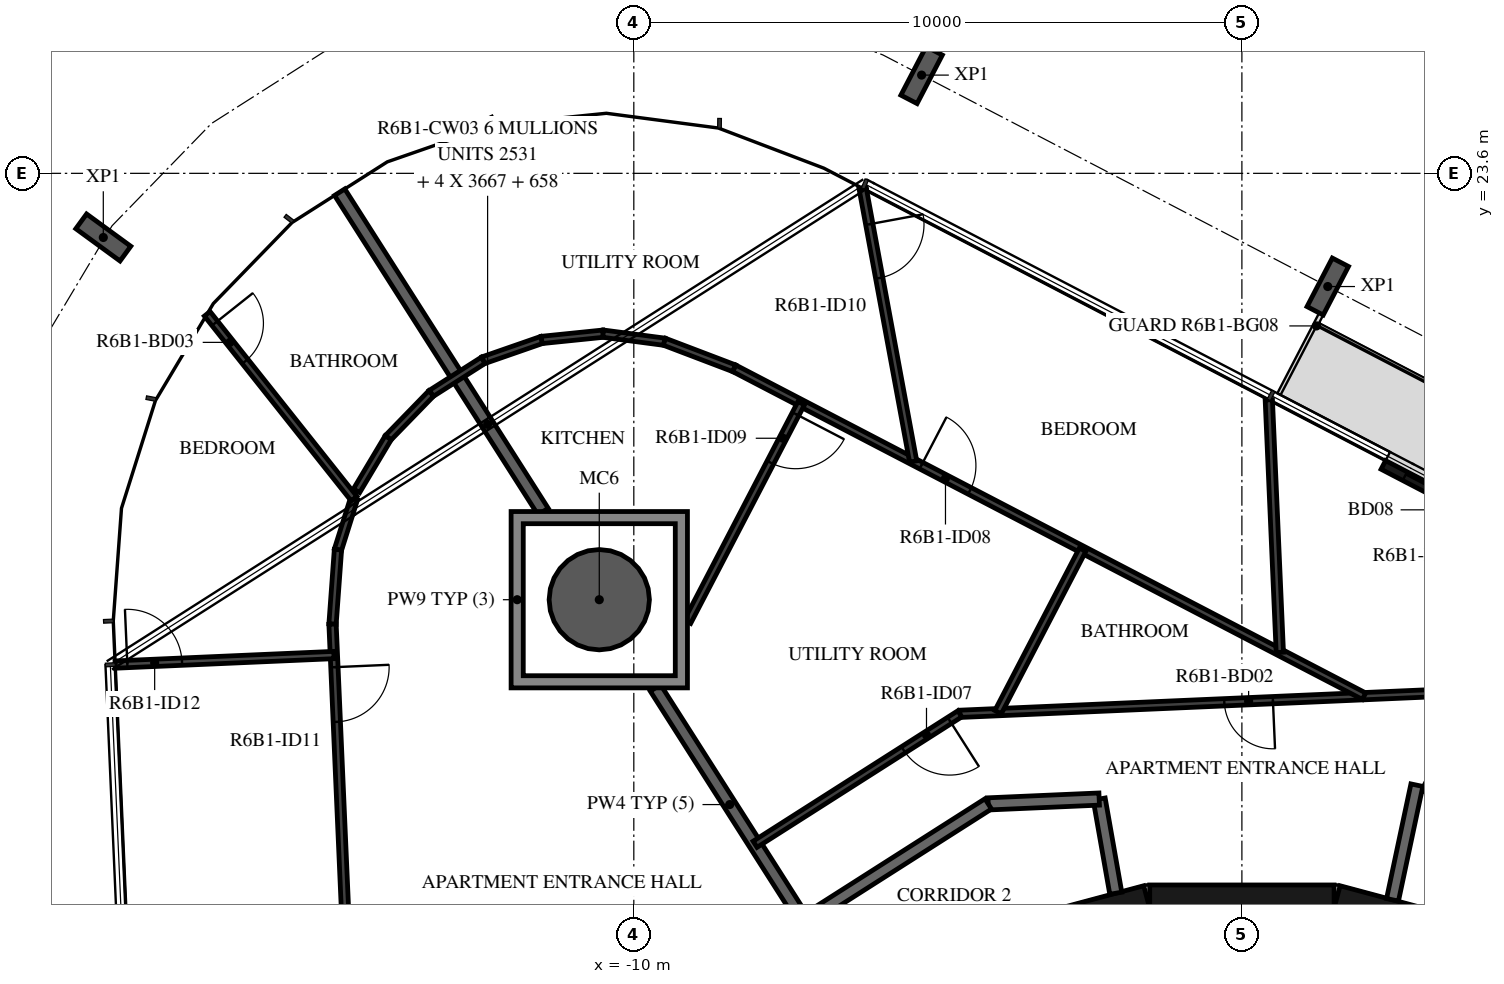
"""IFC4 building model, lengths in metres.
Left out: names, types, materials, properties, quantities, classifications, styles, units other than length and angle.
Written with IfcOpenShell. Run it as: python <this file> out.ifc"""

import sys

from ifc_helpers import new_model, si_unit, direction, frame, frame_2d, origin, origin_2d, place, context, subcontext, project, spatial, polyline, rectangle, hollow_circle, i_section, outline, extrude, element, fill, save


model = new_model("IFC4")
c1 = context("Model", 3, precision=1e-05, world=origin(), true_north=direction((0.0, 1.0)))
c2 = subcontext(c1, "Body", "Model", "MODEL_VIEW")
j1 = project(units=[si_unit("LENGTHUNIT", "METRE"), si_unit("PLANEANGLEUNIT", "RADIAN")], contexts=[c1])
p1 = place(None, origin())
s1 = spatial("IfcSite", under=j1, at=p1, CompositionType="ELEMENT")
p2 = place(p1, origin())
s2 = spatial("IfcBuilding", under=s1, at=p2, CompositionType="ELEMENT")
p3 = place(p2, frame((0.0, 0.0, 237.2)))
s3 = spatial("IfcBuildingStorey", under=s2, at=p3, CompositionType="ELEMENT", Elevation=237.2)
p4 = place(p3, frame((-10.568, 16.588, -0.38), z_axis=(0.0, 0.0, 1.0), x_axis=(1.0, 0.0, 0.0)))
e1 = element("IfcColumn", 1, at=p4, inside=s3, PredefinedType="COLUMN", context=c2, shape_type="SweptSolid", body=[
    extrude(hollow_circle(Radius=0.825, WallThickness=0.04, at=origin_2d()), origin(), (0.0, 0.0, 1.0), 3.5),
])
for number, where, z_axis, x_axis in (
    (2, (1.412, 21.739, -0.38), (0.0, 0.0, 1.0), (0.887, -0.462, 0.0)),
    (3, (-5.267, 25.216, -0.38), (0.0, 0.0, 1.0), (0.887, -0.462, 0.0)),
    (4, (-18.724, 22.545, -0.38), (0.0, 0.0, 1.0), (0.59, 0.808, 0.0)),
):
    element("IfcColumn", number, at=place(p3, frame(where, z_axis=z_axis, x_axis=x_axis)), inside=s3, PredefinedType="COLUMN", context=c2, shape_type="SweptSolid", body=[
        extrude(i_section(OverallWidth=0.3, OverallDepth=0.9, WebThickness=0.019, FlangeThickness=0.035, FilletRadius=0.03, at=origin_2d()), origin(), (0.0, 0.0, 1.0), 3.5),
    ])
p5 = place(p3, frame((5.164, 17.327, 0.0), z_axis=(0.0, 0.0, 1.0), x_axis=(-0.886983100078, 0.461801884119, 0.0)))
e5 = element("IfcWall", 5, at=p5, inside=s3, PredefinedType="STANDARD", context=c2, shape_type="SweptSolid", body=[
    extrude(rectangle(XDim=3.2, YDim=0.16, at=frame_2d((1.6, 0.0))), origin(), (0.0, 0.0, 1.0), 3.12),
])
p6 = place(p5, frame((0.4, 0.0, 0.0)))
e6 = element("IfcOpeningElement", 6, at=p6, cuts=e5, PredefinedType="OPENING", context=c2, shape_type="SweptSolid", body=[
    extrude(rectangle(XDim=2.4, YDim=2.4, at=frame_2d((1.2, 1.2))), frame((0.0, 0.09, 0.0), z_axis=(0.0, -1.0, 0.0), x_axis=(1.0, 0.0, 0.0)), (0.0, 0.0, 1.0), 0.18),
])
for number, where, z_axis, x_axis in (
    (7, (4.479, 10.858, 0.0), (0.0, 0.0, 1.0), (-0.966, 0.259, 0.0)),
    (8, (1.516, 11.647, 0.0), (0.0, 0.0, 1.0), (-1.0, 0.0, 0.0)),
    (9, (-1.55, 11.643, 0.0), (0.0, 0.0, 1.0), (-0.966, -0.259, 0.0)),
):
    element("IfcWall", number, at=place(p3, frame(where, z_axis=z_axis, x_axis=x_axis)), inside=s3, PredefinedType="SHEAR", context=c2, shape_type="SweptSolid", body=[
        extrude(rectangle(XDim=3.033, YDim=0.5, at=frame_2d((1.516, 0.0))), origin(), (0.0, 0.0, 1.0), 3.12),
    ])
p7 = place(p3, frame((9.372, 10.228, 0.0), z_axis=(0.0, 0.0, 1.0), x_axis=(-0.887005184532, 0.461759464021, 0.0)))
e10 = element("IfcWall", 10, at=p7, inside=s3, PredefinedType="STANDARD", context=c2, shape_type="SweptSolid", body=[
    extrude(rectangle(XDim=7.181, YDim=0.2, at=frame_2d((3.591, 0.0))), origin(), (0.0, 0.0, 1.0), 3.12),
])
p8 = place(p3, frame((2.878, 13.538, 0.0), z_axis=(0.0, 0.0, 1.0), x_axis=(-0.207893604596, -0.978151444904, 0.0)))
e11 = element("IfcWall", 11, at=p8, inside=s3, PredefinedType="STANDARD", context=c2, shape_type="SweptSolid", body=[
    extrude(rectangle(XDim=1.927, YDim=0.2, at=frame_2d((0.963, 0.0))), origin(), (0.0, 0.0, 1.0), 3.12),
])
p9 = place(p3, frame((-2.074, 11.761, 0.0), z_axis=(0.0, 0.0, 1.0), x_axis=(-0.173679082312, 0.984802303189, 0.0)))
e12 = element("IfcWall", 12, at=p9, inside=s3, PredefinedType="STANDARD", context=c2, shape_type="SweptSolid", body=[
    extrude(rectangle(XDim=1.573, YDim=0.2, at=frame_2d((0.787, 0.0))), origin(), (0.0, 0.0, 1.0), 3.12),
])
p10 = place(p3, frame((-2.347, 13.31, 0.0), z_axis=(0.0, 0.0, 1.0), x_axis=(-0.999050095671, -0.043576442492, 0.0)))
e13 = element("IfcWall", 13, at=p10, inside=s3, PredefinedType="STANDARD", context=c2, shape_type="SweptSolid", body=[
    extrude(rectangle(XDim=1.826, YDim=0.2, at=frame_2d((0.913, 0.0))), origin(), (0.0, 0.0, 1.0), 3.12),
])
p11 = place(p3, frame((-4.172, 13.231, 0.0), z_axis=(0.0, 0.0, 1.0), x_axis=(-0.843388394728, -0.537304397561, 0.0)))
e14 = element("IfcWall", 14, at=p11, inside=s3, PredefinedType="STANDARD", context=c2, shape_type="SweptSolid", body=[
    extrude(rectangle(XDim=7.181, YDim=0.2, at=frame_2d((3.59, 0.0))), origin(), (0.0, 0.0, 1.0), 3.12),
])
p12 = place(p3, frame((-9.645, 15.138, 0.0), z_axis=(0.0, 0.0, 1.0), x_axis=(0.537267800866, -0.84341170857, 0.0)))
e15 = element("IfcWall", 15, at=p12, inside=s3, PredefinedType="STANDARD", context=c2, shape_type="SweptSolid", body=[
    extrude(rectangle(XDim=4.55, YDim=0.2, at=frame_2d((2.275, 0.0))), origin(), (0.0, 0.0, 1.0), 3.12),
])
p13 = place(p3, frame((-14.837, 23.29, 0.0), z_axis=(0.0, 0.0, 1.0), x_axis=(0.537316863221, -0.843380452998, 0.0)))
e16 = element("IfcWall", 16, at=p13, inside=s3, PredefinedType="STANDARD", context=c2, shape_type="SweptSolid", body=[
    extrude(rectangle(XDim=6.227, YDim=0.2, at=frame_2d((3.113, 0.0))), origin(), (0.0, 0.0, 1.0), 3.12),
])
p14 = place(p3, frame((3.339, 15.06, 0.0), z_axis=(0.0, 0.0, 1.0), x_axis=(-0.999047716945, -0.043630943905, 0.0)))
e17 = element("IfcWall", 17, at=p14, inside=s3, PredefinedType="PARTITIONING", context=c2, shape_type="SweptSolid", body=[
    extrude(rectangle(XDim=7.985, YDim=0.12, at=frame_2d((3.992, 0.0))), origin(), (0.0, 0.0, 1.0), 3.12),
])
p15 = place(p14, frame((2.831, 0.0, 0.0)))
e18 = element("IfcOpeningElement", 18, at=p15, cuts=e17, PredefinedType="OPENING", context=c2, shape_type="SweptSolid", body=[
    extrude(rectangle(XDim=0.8, YDim=2.1, at=frame_2d((0.4, 1.05))), frame((0.0, 0.07, 0.0), z_axis=(0.0, -1.0, 0.0), x_axis=(1.0, 0.0, 0.0)), (0.0, 0.0, 1.0), 0.14),
])
p16 = place(p3, frame((-4.639, 14.712, 0.0), z_axis=(0.0, 0.0, 1.0), x_axis=(-0.843376843237, -0.537322529113, 0.0)))
e19 = element("IfcWall", 19, at=p16, inside=s3, PredefinedType="PARTITIONING", context=c2, shape_type="SweptSolid", body=[
    extrude(rectangle(XDim=3.992, YDim=0.12, at=frame_2d((1.996, 0.0))), origin(), (0.0, 0.0, 1.0), 3.12),
])
p17 = place(p16, frame((0.2, 0.0, 0.0)))
e20 = element("IfcOpeningElement", 20, at=p17, cuts=e19, PredefinedType="OPENING", context=c2, shape_type="SweptSolid", body=[
    extrude(rectangle(XDim=0.9, YDim=2.1, at=frame_2d((0.45, 1.05))), frame((0.0, 0.07, 0.0), z_axis=(0.0, -1.0, 0.0), x_axis=(1.0, 0.0, 0.0)), (0.0, 0.0, 1.0), 0.14),
])
p18 = place(p3, frame((-8.35, 20.394, 0.0), z_axis=(0.0, 0.0, 1.0), x_axis=(0.887020940825, -0.461729196107, 0.0)))
e21 = element("IfcWall", 21, at=p18, inside=s3, PredefinedType="PARTITIONING", context=c2, shape_type="SweptSolid", body=[
    extrude(rectangle(XDim=11.678, YDim=0.12, at=frame_2d((5.839, 0.0))), origin(), (0.0, 0.0, 1.0), 3.12),
])
p19 = place(p18, frame((3.469, 0.0, 0.0)))
e22 = element("IfcOpeningElement", 22, at=p19, cuts=e21, PredefinedType="OPENING", context=c2, shape_type="SweptSolid", body=[
    extrude(rectangle(XDim=0.9, YDim=2.1, at=frame_2d((0.45, 1.05))), frame((0.0, 0.07, 0.0), z_axis=(0.0, -1.0, 0.0), x_axis=(1.0, 0.0, 0.0)), (0.0, 0.0, 1.0), 0.14),
])
p20 = place(p3, frame((0.442, 19.876, 0.0), z_axis=(0.0, 0.0, 1.0), x_axis=(0.043638577658, -0.999047383531, 0.0)))
e23 = element("IfcWall", 23, at=p20, inside=s3, PredefinedType="PARTITIONING", context=c2, shape_type="SweptSolid", body=[
    extrude(rectangle(XDim=4.157, YDim=0.12, at=frame_2d((2.078, 0.0))), origin(), (0.0, 0.0, 1.0), 3.12),
])
p21 = place(p3, frame((-2.619, 17.411, 0.0), z_axis=(0.0, 0.0, 1.0), x_axis=(-0.461743141736, -0.887013681439, 0.0)))
e24 = element("IfcWall", 24, at=p21, inside=s3, PredefinedType="PARTITIONING", context=c2, shape_type="SweptSolid", body=[
    extrude(rectangle(XDim=3.012, YDim=0.12, at=frame_2d((1.506, 0.0))), origin(), (0.0, 0.0, 1.0), 3.12),
])
p22 = place(p3, frame((-6.237, 23.353, 0.0), z_axis=(0.0, 0.0, 1.0), x_axis=(0.181909323114, -0.983315309636, 0.0)))
e25 = element("IfcWall", 25, at=p22, inside=s3, PredefinedType="PARTITIONING", context=c2, shape_type="SweptSolid", body=[
    extrude(rectangle(XDim=4.567, YDim=0.12, at=frame_2d((2.284, 0.0))), origin(), (0.0, 0.0, 1.0), 3.12),
])
p23 = place(p22, frame((0.6, 0.0, 0.0)))
e26 = element("IfcOpeningElement", 26, at=p23, cuts=e25, PredefinedType="OPENING", context=c2, shape_type="SweptSolid", body=[
    extrude(rectangle(XDim=0.9, YDim=2.1, at=frame_2d((0.45, 1.05))), frame((0.0, 0.07, 0.0), z_axis=(0.0, -1.0, 0.0), x_axis=(1.0, 0.0, 0.0)), (0.0, 0.0, 1.0), 0.14),
])
p24 = place(p3, frame((-7.247, 19.82, 0.0), z_axis=(0.0, 0.0, 1.0), x_axis=(-0.461733980956, -0.887018450107, 0.0)))
e27 = element("IfcWall", 27, at=p24, inside=s3, PredefinedType="PARTITIONING", context=c2, shape_type="SweptSolid", body=[
    extrude(rectangle(XDim=4.052, YDim=0.12, at=frame_2d((2.026, 0.0))), origin(), (0.0, 0.0, 1.0), 3.12),
])
p25 = place(p24, frame((0.2, 0.0, 0.0)))
e28 = element("IfcOpeningElement", 28, at=p25, cuts=e27, PredefinedType="OPENING", context=c2, shape_type="SweptSolid", body=[
    extrude(rectangle(XDim=0.9, YDim=2.1, at=frame_2d((0.45, 1.05))), frame((0.0, 0.07, 0.0), z_axis=(0.0, -1.0, 0.0), x_axis=(1.0, 0.0, 0.0)), (0.0, 0.0, 1.0), 0.14),
])
for number, where, z_axis, x_axis in (
    (29, (-13.332, 19.981, 0.0), (0.0, 0.0, 1.0), (0.843, 0.537, 0.0)),
    (30, (-12.475, 20.527, 0.0), (0.0, 0.0, 1.0), (0.945, 0.328, 0.0)),
):
    element("IfcWall", number, at=place(p3, frame(where, z_axis=z_axis, x_axis=x_axis)), inside=s3, PredefinedType="PARTITIONING", context=c2, shape_type="SweptSolid", body=[
        extrude(rectangle(XDim=1.016, YDim=0.12, at=frame_2d((0.508, 0.0))), origin(), (0.0, 0.0, 1.0), 3.12),
    ])
p26 = place(p3, frame((-11.515, 20.86, 0.0), z_axis=(0.0, 0.0, 1.0), x_axis=(0.994818278641, 0.101669034034, 0.0)))
e31 = element("IfcWall", 31, at=p26, inside=s3, PredefinedType="PARTITIONING", context=c2, shape_type="SweptSolid", body=[
    extrude(rectangle(XDim=1.016, YDim=0.12, at=frame_2d((0.508, 0.0))), origin(), (0.0, 0.0, 1.0), 3.12),
])
p27 = place(p3, frame((-10.504, 20.963, 0.0), z_axis=(0.0, 0.0, 1.0), x_axis=(0.991451023706, -0.13047937612, 0.0)))
e32 = element("IfcWall", 32, at=p27, inside=s3, PredefinedType="PARTITIONING", context=c2, shape_type="SweptSolid", body=[
    extrude(rectangle(XDim=1.016, YDim=0.12, at=frame_2d((0.508, 0.0))), origin(), (0.0, 0.0, 1.0), 3.12),
])
p28 = place(p3, frame((-9.497, 20.831, 0.0), z_axis=(0.0, 0.0, 1.0), x_axis=(0.934575963521, -0.355763641213, 0.0)))
e33 = element("IfcWall", 33, at=p28, inside=s3, PredefinedType="PARTITIONING", context=c2, shape_type="SweptSolid", body=[
    extrude(rectangle(XDim=1.227, YDim=0.12, at=frame_2d((0.614, 0.0))), origin(), (0.0, 0.0, 1.0), 3.12),
])
for number, where, z_axis, x_axis in (
    (34, (-13.332, 19.981, 0.0), (0.0, 0.0, 1.0), (-0.697, -0.717, 0.0)),
    (35, (-14.039, 19.252, 0.0), (0.0, 0.0, 1.0), (-0.513, -0.859, 0.0)),
):
    element("IfcWall", number, at=place(p3, frame(where, z_axis=z_axis, x_axis=x_axis)), inside=s3, PredefinedType="PARTITIONING", context=c2, shape_type="SweptSolid", body=[
        extrude(rectangle(XDim=1.016, YDim=0.12, at=frame_2d((0.508, 0.0))), origin(), (0.0, 0.0, 1.0), 3.12),
    ])
p29 = place(p3, frame((-14.601, 18.25, 0.0), z_axis=(0.0, 0.0, 1.0), x_axis=(-0.300706496876, -0.953716730867, 0.0)))
e36 = element("IfcWall", 36, at=p29, inside=s3, PredefinedType="PARTITIONING", context=c2, shape_type="SweptSolid", body=[
    extrude(rectangle(XDim=0.88, YDim=0.12, at=frame_2d((0.44, 0.0))), origin(), (0.0, 0.0, 1.0), 3.12),
])
p30 = place(p3, frame((-14.865, 17.411, 0.0), z_axis=(0.0, 0.0, 1.0), x_axis=(-0.072618457011, -0.997359794508, 0.0)))
e37 = element("IfcWall", 37, at=p30, inside=s3, PredefinedType="PARTITIONING", context=c2, shape_type="SweptSolid", body=[
    extrude(rectangle(XDim=1.227, YDim=0.12, at=frame_2d((0.614, 0.0))), origin(), (0.0, 0.0, 1.0), 3.12),
])
p31 = place(p3, frame((-14.955, 16.187, 0.0), z_axis=(0.0, 0.0, 1.0), x_axis=(0.04360777668, -0.999048728448, 0.0)))
e38 = element("IfcWall", 38, at=p31, inside=s3, PredefinedType="PARTITIONING", context=c2, shape_type="SweptSolid", body=[
    extrude(rectangle(XDim=11.679, YDim=0.12, at=frame_2d((5.839, 0.0))), origin(), (0.0, 0.0, 1.0), 3.12),
])
p32 = place(p31, frame((0.709, 0.0, 0.0)))
e39 = element("IfcOpeningElement", 39, at=p32, cuts=e38, PredefinedType="OPENING", context=c2, shape_type="SweptSolid", body=[
    extrude(rectangle(XDim=0.9, YDim=2.1, at=frame_2d((0.45, 1.05))), frame((0.0, 0.07, 0.0), z_axis=(0.0, -1.0, 0.0), x_axis=(1.0, 0.0, 0.0)), (0.0, 0.0, 1.0), 0.14),
])
p33 = place(p3, frame((-17.015, 21.29, 0.0), z_axis=(0.0, 0.0, 1.0), x_axis=(0.621976289729, -0.783036075168, 0.0)))
e40 = element("IfcWall", 40, at=p33, inside=s3, PredefinedType="PARTITIONING", context=c2, shape_type="SweptSolid", body=[
    extrude(rectangle(XDim=3.882, YDim=0.12, at=frame_2d((1.941, 0.0))), origin(), (0.0, 0.0, 1.0), 3.12),
])
p34 = place(p33, frame((0.2, 0.0, 0.0)))
e41 = element("IfcOpeningElement", 41, at=p34, cuts=e40, PredefinedType="OPENING", context=c2, shape_type="SweptSolid", body=[
    extrude(rectangle(XDim=0.8, YDim=2.1, at=frame_2d((0.4, 1.05))), frame((0.0, 0.07, 0.0), z_axis=(0.0, -1.0, 0.0), x_axis=(1.0, 0.0, 0.0)), (0.0, 0.0, 1.0), 0.14),
])
p35 = place(p3, frame((-18.529, 15.522, 0.0), z_axis=(0.0, 0.0, 1.0), x_axis=(0.999048722018, 0.043607923987, 0.0)))
e42 = element("IfcWall", 42, at=p35, inside=s3, PredefinedType="PARTITIONING", context=c2, shape_type="SweptSolid", body=[
    extrude(rectangle(XDim=3.6, YDim=0.12, at=frame_2d((1.8, 0.0))), origin(), (0.0, 0.0, 1.0), 2.73),
])
p36 = place(p35, frame((0.2, 0.0, 0.0)))
e43 = element("IfcOpeningElement", 43, at=p36, cuts=e42, PredefinedType="OPENING", context=c2, shape_type="SweptSolid", body=[
    extrude(rectangle(XDim=0.9, YDim=2.1, at=frame_2d((0.45, 1.05))), frame((0.0, 0.07, 0.0), z_axis=(0.0, -1.0, 0.0), x_axis=(1.0, 0.0, 0.0)), (0.0, 0.0, 1.0), 0.14),
])
p37 = place(p3, origin())
e44 = element("IfcWall", 44, at=p37, inside=s3, PredefinedType="STANDARD", context=c2, shape_type="SweptSolid", body=[
    extrude(outline(polyline([(-9.118, 18.038), (-9.118, 15.138), (-12.018, 15.138), (-12.018, 18.038), (-9.118, 18.038)]), holes=[polyline([(-11.818, 15.338), (-9.318, 15.338), (-9.318, 17.838), (-11.818, 17.838), (-11.818, 15.338)])]), origin(), (0.0, 0.0, 1.0), 3.12),
])
p38 = place(p6, origin())
e45 = element("IfcDoor", 45, at=p38, inside=s3, OperationType="DOUBLE_DOOR_SLIDING", PredefinedType="DOOR", context=c2, shape_type="SweptSolid", body=[
    extrude(rectangle(XDim=2.4, YDim=2.4, at=frame_2d((1.2, 1.2))), frame((0.0, 0.025, 0.0), z_axis=(0.0, -1.0, 0.0), x_axis=(1.0, 0.0, 0.0)), (0.0, 0.0, 1.0), 0.05),
])
fill(e6, e45)
p39 = place(p15, origin())
e46 = element("IfcDoor", 46, at=p39, inside=s3, OperationType="SINGLE_SWING_RIGHT", PredefinedType="DOOR", context=c2, shape_type="SweptSolid", body=[
    extrude(rectangle(XDim=0.8, YDim=2.1, at=frame_2d((0.4, 1.05))), frame((0.0, 0.025, 0.0), z_axis=(0.0, -1.0, 0.0), x_axis=(1.0, 0.0, 0.0)), (0.0, 0.0, 1.0), 0.05),
])
fill(e18, e46)
p40 = place(p17, origin())
e47 = element("IfcDoor", 47, at=p40, inside=s3, OperationType="SINGLE_SWING_RIGHT", PredefinedType="DOOR", context=c2, shape_type="SweptSolid", body=[
    extrude(rectangle(XDim=0.9, YDim=2.1, at=frame_2d((0.45, 1.05))), frame((0.0, 0.025, 0.0), z_axis=(0.0, -1.0, 0.0), x_axis=(1.0, 0.0, 0.0)), (0.0, 0.0, 1.0), 0.05),
])
fill(e20, e47)
p41 = place(p19, origin())
e48 = element("IfcDoor", 48, at=p41, inside=s3, OperationType="SINGLE_SWING_RIGHT", PredefinedType="DOOR", context=c2, shape_type="SweptSolid", body=[
    extrude(rectangle(XDim=0.9, YDim=2.1, at=frame_2d((0.45, 1.05))), frame((0.0, 0.025, 0.0), z_axis=(0.0, -1.0, 0.0), x_axis=(1.0, 0.0, 0.0)), (0.0, 0.0, 1.0), 0.05),
])
fill(e22, e48)
p42 = place(p25, origin())
e49 = element("IfcDoor", 49, at=p42, inside=s3, OperationType="SINGLE_SWING_RIGHT", PredefinedType="DOOR", context=c2, shape_type="SweptSolid", body=[
    extrude(rectangle(XDim=0.9, YDim=2.1, at=frame_2d((0.45, 1.05))), frame((0.0, 0.025, 0.0), z_axis=(0.0, -1.0, 0.0), x_axis=(1.0, 0.0, 0.0)), (0.0, 0.0, 1.0), 0.05),
])
fill(e28, e49)
p43 = place(p23, origin())
e50 = element("IfcDoor", 50, at=p43, inside=s3, OperationType="SINGLE_SWING_RIGHT", PredefinedType="DOOR", context=c2, shape_type="SweptSolid", body=[
    extrude(rectangle(XDim=0.9, YDim=2.1, at=frame_2d((0.45, 1.05))), frame((0.0, 0.025, 0.0), z_axis=(0.0, -1.0, 0.0), x_axis=(1.0, 0.0, 0.0)), (0.0, 0.0, 1.0), 0.05),
])
fill(e26, e50)
p44 = place(p32, origin())
e51 = element("IfcDoor", 51, at=p44, inside=s3, OperationType="SINGLE_SWING_LEFT", PredefinedType="DOOR", context=c2, shape_type="SweptSolid", body=[
    extrude(rectangle(XDim=0.9, YDim=2.1, at=frame_2d((0.45, 1.05))), frame((0.0, 0.025, 0.0), z_axis=(0.0, -1.0, 0.0), x_axis=(1.0, 0.0, 0.0)), (0.0, 0.0, 1.0), 0.05),
])
fill(e39, e51)
p45 = place(p36, origin())
e52 = element("IfcDoor", 52, at=p45, inside=s3, OperationType="SINGLE_SWING_LEFT", PredefinedType="DOOR", context=c2, shape_type="SweptSolid", body=[
    extrude(rectangle(XDim=0.9, YDim=2.1, at=frame_2d((0.45, 1.05))), frame((0.0, 0.025, 0.0), z_axis=(0.0, -1.0, 0.0), x_axis=(1.0, 0.0, 0.0)), (0.0, 0.0, 1.0), 0.05),
])
fill(e43, e52)
p46 = place(p34, origin())
e53 = element("IfcDoor", 53, at=p46, inside=s3, OperationType="SINGLE_SWING_LEFT", PredefinedType="DOOR", context=c2, shape_type="SweptSolid", body=[
    extrude(rectangle(XDim=0.8, YDim=2.1, at=frame_2d((0.4, 1.05))), frame((0.0, 0.025, 0.0), z_axis=(0.0, -1.0, 0.0), x_axis=(1.0, 0.0, 0.0)), (0.0, 0.0, 1.0), 0.05),
])
fill(e41, e53)
save(model, sys.argv[1])
